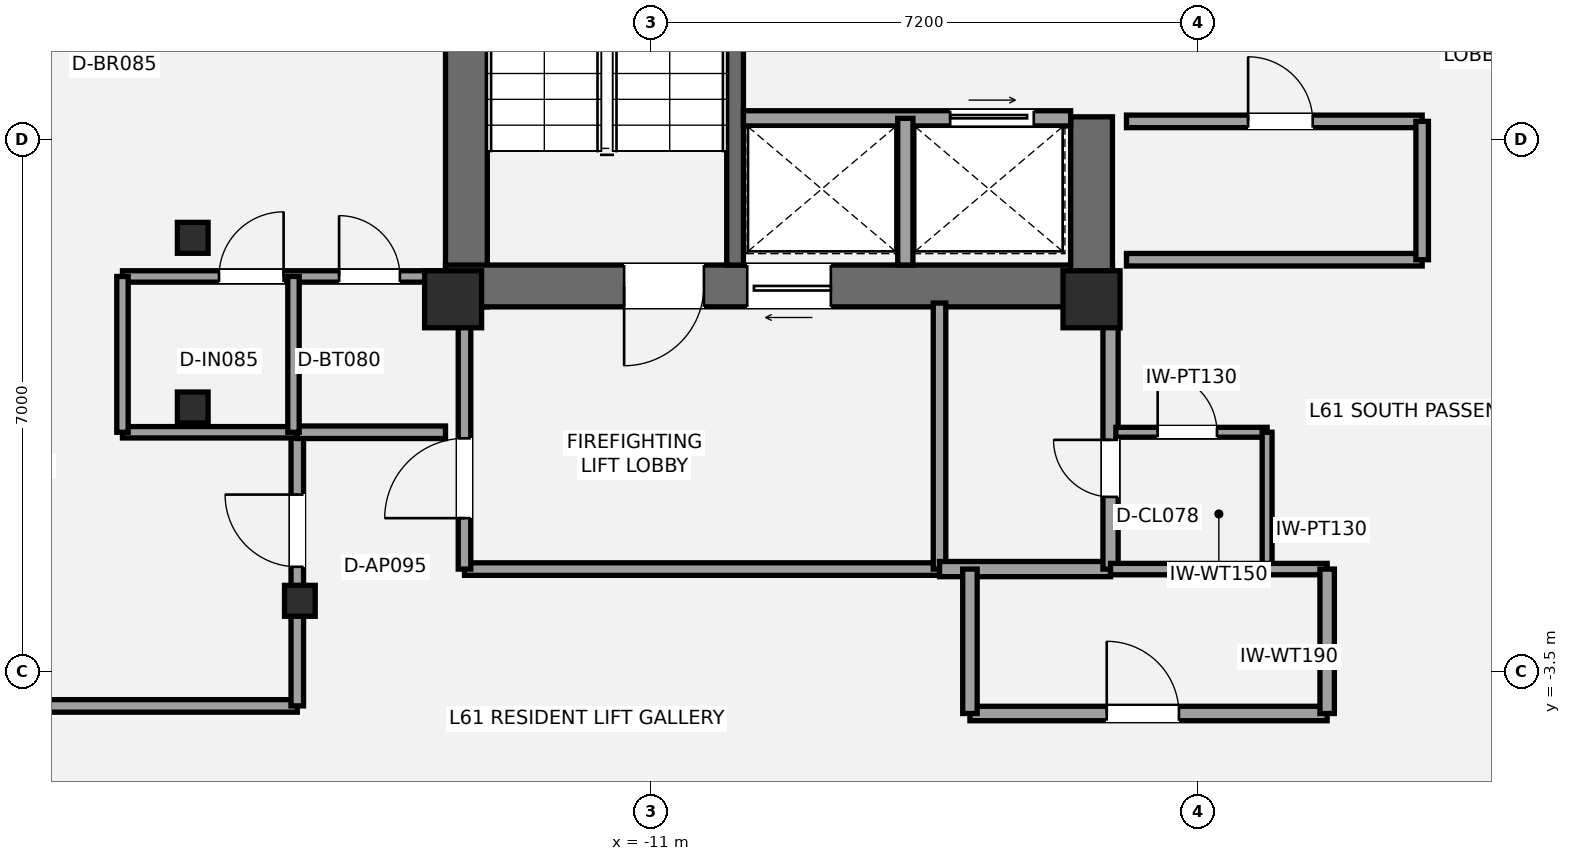
"""IFC4 building model, lengths in metres.
Left out: names, types, materials, properties, quantities, classifications, styles, units other than length and angle.
Written with IfcOpenShell. Run it as: python <this file> out.ifc"""

import sys

from ifc_helpers import new_model, si_unit, direction, frame, frame_2d, origin, origin_2d, place, context, subcontext, project, spatial, rectangle, i_section, extrude, element, fill, save


model = new_model("IFC4")
c1 = context("Model", 3, precision=1e-05, world=origin(), true_north=direction((0.0, 1.0)))
c2 = subcontext(c1, "Body", "Model", "MODEL_VIEW")
j1 = project(units=[si_unit("LENGTHUNIT", "METRE"), si_unit("PLANEANGLEUNIT", "RADIAN")], contexts=[c1])
p1 = place(None, origin())
s1 = spatial("IfcSite", under=j1, at=p1, CompositionType="ELEMENT")
p2 = place(p1, origin())
s2 = spatial("IfcBuilding", under=s1, at=p2, CompositionType="ELEMENT")
p3 = place(p2, frame((0.0, 0.0, 219.45)))
s3 = spatial("IfcBuildingStorey", under=s2, at=p3, CompositionType="ELEMENT", Elevation=219.45)
p4 = place(p3, frame((-13.425, 1.3, 0.0), z_axis=(0.0, 0.0, 1.0), x_axis=(0.0, 1.0, 0.0)))
e1 = element("IfcWall", 1, at=p4, inside=s3, PredefinedType="SHEAR", context=c2, shape_type="SweptSolid", body=[
    extrude(rectangle(XDim=8.25, YDim=0.55, at=frame_2d((4.125, 0.0))), origin(), (0.0, 0.0, 1.0), 3.15),
])
p5 = place(p3, frame((-4.925, 1.575, 0.0), z_axis=(0.0, 0.0, 1.0), x_axis=(-1.0, 0.0, 0.0)))
e2 = element("IfcWall", 2, at=p5, inside=s3, PredefinedType="SHEAR", context=c2, shape_type="SweptSolid", body=[
    extrude(rectangle(XDim=8.775, YDim=0.55, at=frame_2d((4.387, 0.0))), origin(), (0.0, 0.0, 1.0), 3.15),
])
p6 = place(p5, frame((5.375, 0.0, 0.0)))
e3 = element("IfcOpeningElement", 3, at=p6, cuts=e2, PredefinedType="OPENING", context=c2, shape_type="SweptSolid", body=[
    extrude(rectangle(XDim=1.05, YDim=2.15, at=frame_2d((0.525, 1.075))), frame((0.0, 0.285, 0.0), z_axis=(0.0, -1.0, 0.0), x_axis=(1.0, 0.0, 0.0)), (0.0, 0.0, 1.0), 0.57),
])
p7 = place(p5, frame((3.705, 0.0, 0.0)))
e4 = element("IfcOpeningElement", 4, at=p7, cuts=e2, PredefinedType="OPENING", context=c2, shape_type="SweptSolid", body=[
    extrude(rectangle(XDim=1.1, YDim=2.2, at=frame_2d((0.55, 1.1))), frame((0.0, 0.285, 0.0), z_axis=(0.0, -1.0, 0.0), x_axis=(1.0, 0.0, 0.0)), (0.0, 0.0, 1.0), 0.57),
])
p8 = place(p3, frame((-5.2, 1.3, 0.0), z_axis=(0.0, 0.0, 1.0), x_axis=(0.0, 1.0, 0.0)))
e5 = element("IfcWall", 5, at=p8, inside=s3, PredefinedType="SHEAR", context=c2, shape_type="SweptSolid", body=[
    extrude(rectangle(XDim=2.5, YDim=0.55, at=frame_2d((1.25, 0.0))), origin(), (0.0, 0.0, 1.0), 3.15),
])
p9 = place(p3, frame((-9.89, 1.85, 0.0), z_axis=(0.0, 0.0, 1.0), x_axis=(0.0, 1.0, 0.0)))
e6 = element("IfcWall", 6, at=p9, inside=s3, PredefinedType="SHEAR", context=c2, shape_type="SweptSolid", body=[
    extrude(rectangle(XDim=7.15, YDim=0.22, at=frame_2d((3.575, 0.0))), origin(), (0.0, 0.0, 1.0), 3.15),
])
for number, where, z_axis, x_axis in (
    (7, (-13.6, 1.4, 0.0), (0.0, 0.0, 1.0), (1.0, 0.0, 0.0)),
    (8, (-5.2, 1.4, 0.0), (0.0, 0.0, 1.0), (1.0, 0.0, 0.0)),
):
    element("IfcColumn", number, at=place(p3, frame(where, z_axis=z_axis, x_axis=x_axis)), inside=s3, PredefinedType="PILASTER", context=c2, shape_type="SweptSolid", body=[
        extrude(rectangle(XDim=0.75, YDim=0.75, at=origin_2d()), origin(), (0.0, 0.0, 1.0), 3.15),
    ])
for number, where, z_axis, x_axis in (
    (9, (-17.026, 2.208, 0.0), (0.0, 0.0, 1.0), (1.0, 0.0, 0.0)),
    (10, (-17.026, -0.024, 0.0), (0.0, 0.0, 1.0), (1.0, 0.0, 0.0)),
    (11, (-15.616, -2.567, 0.0), (0.0, 0.0, 1.0), (1.0, 0.0, 0.0)),
):
    element("IfcColumn", number, at=place(p3, frame(where, z_axis=z_axis, x_axis=x_axis)), inside=s3, PredefinedType="COLUMN", context=c2, shape_type="SweptSolid", body=[
        extrude(i_section(OverallWidth=0.404, OverallDepth=0.407, WebThickness=0.027, FlangeThickness=0.044, at=origin_2d()), origin(), (0.0, 0.0, 1.0), 3.15),
    ])
p10 = place(p3, frame((-13.45, -2.15, 0.0), z_axis=(0.0, 0.0, 1.0), x_axis=(1.0, 0.0, 0.0)))
e12 = element("IfcWall", 12, at=p10, inside=s3, PredefinedType="PARTITIONING", context=c2, shape_type="SweptSolid", body=[
    extrude(rectangle(XDim=6.25, YDim=0.165, at=frame_2d((3.125, 0.0))), origin(), (0.0, 0.0, 1.0), 2.423),
])
p11 = place(p3, frame((-13.45, -2.15, 0.0), z_axis=(0.0, 0.0, 1.0), x_axis=(0.0, 1.0, 0.0)))
e13 = element("IfcWall", 13, at=p11, inside=s3, PredefinedType="PARTITIONING", context=c2, shape_type="SweptSolid", body=[
    extrude(rectangle(XDim=3.5, YDim=0.165, at=frame_2d((1.75, 0.0))), origin(), (0.0, 0.0, 1.0), 2.423),
])
p12 = place(p11, frame((0.67, 0.0, 0.0)))
e14 = element("IfcOpeningElement", 14, at=p12, cuts=e13, PredefinedType="OPENING", context=c2, shape_type="SweptSolid", body=[
    extrude(rectangle(XDim=1.05, YDim=2.15, at=frame_2d((0.525, 1.075))), frame((0.0, 0.093, 0.0), z_axis=(0.0, -1.0, 0.0), x_axis=(1.0, 0.0, 0.0)), (0.0, 0.0, 1.0), 0.185),
])
p13 = place(p3, frame((-7.2, -2.15, 0.0), z_axis=(0.0, 0.0, 1.0), x_axis=(0.0, 1.0, 0.0)))
e15 = element("IfcWall", 15, at=p13, inside=s3, PredefinedType="PARTITIONING", context=c2, shape_type="SweptSolid", body=[
    extrude(rectangle(XDim=3.5, YDim=0.165, at=frame_2d((1.75, 0.0))), origin(), (0.0, 0.0, 1.0), 2.423),
])
p14 = place(p3, frame((-7.2, -2.15, 0.0), z_axis=(0.0, 0.0, 1.0), x_axis=(1.0, 0.0, 0.0)))
e16 = element("IfcWall", 16, at=p14, inside=s3, PredefinedType="SOLIDWALL", context=c2, shape_type="SweptSolid", body=[
    extrude(rectangle(XDim=2.25, YDim=0.2, at=frame_2d((1.125, 0.0))), origin(), (0.0, 0.0, 1.0), 2.423),
])
p15 = place(p3, frame((-4.95, -2.15, 0.0), z_axis=(0.0, 0.0, 1.0), x_axis=(0.0, 1.0, 0.0)))
e17 = element("IfcWall", 17, at=p15, inside=s3, PredefinedType="SOLIDWALL", context=c2, shape_type="SweptSolid", body=[
    extrude(rectangle(XDim=3.5, YDim=0.2, at=frame_2d((1.75, 0.0))), origin(), (0.0, 0.0, 1.0), 2.423),
])
p16 = place(p15, frame((0.95, 0.0, 0.0)))
e18 = element("IfcOpeningElement", 18, at=p16, cuts=e17, PredefinedType="OPENING", context=c2, shape_type="SweptSolid", body=[
    extrude(rectangle(XDim=0.75, YDim=2.1, at=frame_2d((0.375, 1.05))), frame((0.0, 0.11, 0.0), z_axis=(0.0, -1.0, 0.0), x_axis=(1.0, 0.0, 0.0)), (0.0, 0.0, 1.0), 0.22),
])
p17 = place(p3, frame((-4.88, -0.35, 0.0), z_axis=(0.0, 0.0, 1.0), x_axis=(1.0, 0.0, 0.0)))
e19 = element("IfcWall", 19, at=p17, inside=s3, PredefinedType="PARTITIONING", context=c2, shape_type="SweptSolid", body=[
    extrude(rectangle(XDim=1.99, YDim=0.13, at=frame_2d((0.995, 0.0))), origin(), (0.0, 0.0, 1.0), 2.97),
])
p18 = place(p17, frame((0.55, 0.0, 0.0)))
e20 = element("IfcOpeningElement", 20, at=p18, cuts=e19, PredefinedType="OPENING", context=c2, shape_type="SweptSolid", body=[
    extrude(rectangle(XDim=0.78, YDim=2.1, at=frame_2d((0.39, 1.05))), frame((0.0, 0.075, 0.0), z_axis=(0.0, -1.0, 0.0), x_axis=(1.0, 0.0, 0.0)), (0.0, 0.0, 1.0), 0.15),
])
p19 = place(p3, frame((-2.89, -2.15, 0.0), z_axis=(0.0, 0.0, 1.0), x_axis=(0.0, 1.0, 0.0)))
e21 = element("IfcWall", 21, at=p19, inside=s3, PredefinedType="PARTITIONING", context=c2, shape_type="SweptSolid", body=[
    extrude(rectangle(XDim=1.8, YDim=0.13, at=frame_2d((0.9, 0.0))), origin(), (0.0, 0.0, 1.0), 2.423),
])
p20 = place(p3, frame((-9.78, 3.78, 0.0), z_axis=(0.0, 0.0, 1.0), x_axis=(1.0, 0.0, 0.0)))
e22 = element("IfcWall", 22, at=p20, inside=s3, PredefinedType="SOLIDWALL", context=c2, shape_type="SweptSolid", body=[
    extrude(rectangle(XDim=4.305, YDim=0.2, at=frame_2d((2.152, 0.0))), origin(), (0.0, 0.0, 1.0), 2.97),
])
p21 = place(p20, frame((2.72, 0.0, 0.0)))
e23 = element("IfcOpeningElement", 23, at=p21, cuts=e22, PredefinedType="OPENING", context=c2, shape_type="SweptSolid", body=[
    extrude(rectangle(XDim=1.1, YDim=2.2, at=frame_2d((0.55, 1.1))), frame((0.0, 0.11, 0.0), z_axis=(0.0, -1.0, 0.0), x_axis=(1.0, 0.0, 0.0)), (0.0, 0.0, 1.0), 0.22),
])
p22 = place(p3, frame((-7.65, 1.85, 0.0), z_axis=(0.0, 0.0, 1.0), x_axis=(0.0, 1.0, 0.0)))
e24 = element("IfcWall", 24, at=p22, inside=s3, PredefinedType="SOLIDWALL", context=c2, shape_type="SweptSolid", body=[
    extrude(rectangle(XDim=1.93, YDim=0.2, at=frame_2d((0.965, 0.0))), origin(), (0.0, 0.0, 1.0), 2.97),
])
p23 = place(p3, frame((-4.74, 1.92, 0.0), z_axis=(0.0, 0.0, 1.0), x_axis=(1.0, 0.0, 0.0)))
e25 = element("IfcWall", 25, at=p23, inside=s3, PredefinedType="PARTITIONING", context=c2, shape_type="SweptSolid", body=[
    extrude(rectangle(XDim=3.89, YDim=0.165, at=frame_2d((1.945, 0.0))), origin(), (0.0, 0.0, 1.0), 2.11),
])
p24 = place(p3, frame((-4.74, 3.74, 0.0), z_axis=(0.0, 0.0, 1.0), x_axis=(1.0, 0.0, 0.0)))
e26 = element("IfcWall", 26, at=p24, inside=s3, PredefinedType="PARTITIONING", context=c2, shape_type="SweptSolid", body=[
    extrude(rectangle(XDim=3.89, YDim=0.165, at=frame_2d((1.945, 0.0))), origin(), (0.0, 0.0, 1.0), 2.97),
])
p25 = place(p24, frame((1.6, 0.0, 0.0)))
e27 = element("IfcOpeningElement", 27, at=p25, cuts=e26, PredefinedType="OPENING", context=c2, shape_type="SweptSolid", body=[
    extrude(rectangle(XDim=0.85, YDim=2.1, at=frame_2d((0.425, 1.05))), frame((0.0, 0.093, 0.0), z_axis=(0.0, -1.0, 0.0), x_axis=(1.0, 0.0, 0.0)), (0.0, 0.0, 1.0), 0.185),
])
p26 = place(p3, frame((-0.85, 1.92, 0.0), z_axis=(0.0, 0.0, 1.0), x_axis=(0.0, 1.0, 0.0)))
e28 = element("IfcWall", 28, at=p26, inside=s3, PredefinedType="PARTITIONING", context=c2, shape_type="SweptSolid", body=[
    extrude(rectangle(XDim=1.82, YDim=0.165, at=frame_2d((0.91, 0.0))), origin(), (0.0, 0.0, 1.0), 2.97),
])
p27 = place(p3, frame((-6.8, -4.05, 0.0), z_axis=(0.0, 0.0, 1.0), x_axis=(1.0, 0.0, 0.0)))
e29 = element("IfcWall", 29, at=p27, inside=s3, PredefinedType="PLUMBINGWALL", context=c2, shape_type="SweptSolid", body=[
    extrude(rectangle(XDim=4.7, YDim=0.19, at=frame_2d((2.35, 0.0))), origin(), (0.0, 0.0, 1.0), 2.423),
])
p28 = place(p27, frame((1.8, 0.0, 0.0)))
e30 = element("IfcOpeningElement", 30, at=p28, cuts=e29, PredefinedType="OPENING", context=c2, shape_type="SweptSolid", body=[
    extrude(rectangle(XDim=0.95, YDim=2.15, at=frame_2d((0.475, 1.075))), frame((0.0, 0.105, 0.0), z_axis=(0.0, -1.0, 0.0), x_axis=(1.0, 0.0, 0.0)), (0.0, 0.0, 1.0), 0.21),
])
p29 = place(p3, frame((-4.95, -2.15, 0.0), z_axis=(0.0, 0.0, 1.0), x_axis=(1.0, 0.0, 0.0)))
e31 = element("IfcWall", 31, at=p29, inside=s3, PredefinedType="PLUMBINGWALL", context=c2, shape_type="SweptSolid", body=[
    extrude(rectangle(XDim=2.85, YDim=0.15, at=frame_2d((1.425, 0.0))), origin(), (0.0, 0.0, 1.0), 2.423),
])
for number, where, z_axis, x_axis in (
    (32, (-6.8, -4.05, 0.0), (0.0, 0.0, 1.0), (0.0, 1.0, 0.0)),
    (33, (-2.1, -4.05, 0.0), (0.0, 0.0, 1.0), (0.0, 1.0, 0.0)),
):
    element("IfcWall", number, at=place(p3, frame(where, z_axis=z_axis, x_axis=x_axis)), inside=s3, PredefinedType="PLUMBINGWALL", context=c2, shape_type="SweptSolid", body=[
        extrude(rectangle(XDim=1.9, YDim=0.19, at=frame_2d((0.95, 0.0))), origin(), (0.0, 0.0, 1.0), 2.423),
    ])
p30 = place(p3, frame((-21.716, -3.95, 0.0), z_axis=(0.0, 0.0, 1.0), x_axis=(1.0, 0.0, 0.0)))
e34 = element("IfcWall", 34, at=p30, inside=s3, PredefinedType="PARTITIONING", context=c2, shape_type="SweptSolid", body=[
    extrude(rectangle(XDim=6.066, YDim=0.165, at=frame_2d((3.033, 0.0))), origin(), (0.0, 0.0, 1.0), 2.423),
])
p31 = place(p3, frame((-15.65, -3.95, 0.0), z_axis=(0.0, 0.0, 1.0), x_axis=(0.0, 1.0, 0.0)))
e35 = element("IfcWall", 35, at=p31, inside=s3, PredefinedType="PARTITIONING", context=c2, shape_type="SweptSolid", body=[
    extrude(rectangle(XDim=3.6, YDim=0.165, at=frame_2d((1.8, 0.0))), origin(), (0.0, 0.0, 1.0), 2.357),
])
p32 = place(p31, frame((1.83, 0.0, 0.0)))
e36 = element("IfcOpeningElement", 36, at=p32, cuts=e35, PredefinedType="OPENING", context=c2, shape_type="SweptSolid", body=[
    extrude(rectangle(XDim=0.95, YDim=2.15, at=frame_2d((0.475, 1.075))), frame((0.0, 0.093, 0.0), z_axis=(0.0, -1.0, 0.0), x_axis=(1.0, 0.0, 0.0)), (0.0, 0.0, 1.0), 0.185),
])
p33 = place(p3, frame((-15.65, -0.35, 0.0), z_axis=(0.0, 0.0, 1.0), x_axis=(1.0, 0.0, 0.0)))
e37 = element("IfcWall", 37, at=p33, inside=s3, PredefinedType="PARTITIONING", context=c2, shape_type="SweptSolid", body=[
    extrude(rectangle(XDim=1.95, YDim=0.165, at=frame_2d((0.975, 0.0))), origin(), (0.0, 0.0, 1.0), 2.97),
])
p34 = place(p3, frame((-17.95, 1.7, 0.0), z_axis=(0.0, 0.0, 1.0), x_axis=(1.0, 0.0, 0.0)))
e38 = element("IfcWall", 38, at=p34, inside=s3, PredefinedType="PLUMBINGWALL", context=c2, shape_type="SweptSolid", body=[
    extrude(rectangle(XDim=4.25, YDim=0.15, at=frame_2d((2.125, 0.0))), origin(), (0.0, 0.0, 1.0), 2.423),
])
p35 = place(p34, frame((2.85, 0.0, 0.0)))
e39 = element("IfcOpeningElement", 39, at=p35, cuts=e38, PredefinedType="OPENING", context=c2, shape_type="SweptSolid", body=[
    extrude(rectangle(XDim=0.8, YDim=2.1, at=frame_2d((0.4, 1.05))), frame((0.0, 0.085, 0.0), z_axis=(0.0, -1.0, 0.0), x_axis=(1.0, 0.0, 0.0)), (0.0, 0.0, 1.0), 0.17),
])
p36 = place(p34, frame((1.27, 0.0, 0.0)))
e40 = element("IfcOpeningElement", 40, at=p36, cuts=e38, PredefinedType="OPENING", context=c2, shape_type="SweptSolid", body=[
    extrude(rectangle(XDim=0.85, YDim=2.1, at=frame_2d((0.425, 1.05))), frame((0.0, 0.085, 0.0), z_axis=(0.0, -1.0, 0.0), x_axis=(1.0, 0.0, 0.0)), (0.0, 0.0, 1.0), 0.17),
])
p37 = place(p3, frame((-17.95, -0.35, 0.0), z_axis=(0.0, 0.0, 1.0), x_axis=(1.0, 0.0, 0.0)))
e41 = element("IfcWall", 41, at=p37, inside=s3, PredefinedType="PLUMBINGWALL", context=c2, shape_type="SweptSolid", body=[
    extrude(rectangle(XDim=2.3, YDim=0.15, at=frame_2d((1.15, 0.0))), origin(), (0.0, 0.0, 1.0), 2.423),
])
p38 = place(p3, frame((-15.7, -0.35, 0.0), z_axis=(0.0, 0.0, 1.0), x_axis=(0.0, 1.0, 0.0)))
e42 = element("IfcWall", 42, at=p38, inside=s3, PredefinedType="PLUMBINGWALL", context=c2, shape_type="SweptSolid", body=[
    extrude(rectangle(XDim=2.05, YDim=0.15, at=frame_2d((1.025, 0.0))), origin(), (0.0, 0.0, 1.0), 2.97),
])
p39 = place(p3, frame((-17.95, -0.35, 0.0), z_axis=(0.0, 0.0, 1.0), x_axis=(0.0, 1.0, 0.0)))
e43 = element("IfcWall", 43, at=p39, inside=s3, PredefinedType="PLUMBINGWALL", context=c2, shape_type="SweptSolid", body=[
    extrude(rectangle(XDim=2.05, YDim=0.15, at=frame_2d((1.025, 0.0))), origin(), (0.0, 0.0, 1.0), 2.423),
])
p40 = place(p6, origin())
e44 = element("IfcDoor", 44, at=p40, inside=s3, OperationType="SINGLE_SWING_RIGHT", PredefinedType="DOOR", context=c2, shape_type="SweptSolid", body=[
    extrude(rectangle(XDim=1.05, YDim=2.15, at=frame_2d((0.525, 1.075))), frame((0.0, 0.025, 0.0), z_axis=(0.0, -1.0, 0.0), x_axis=(1.0, 0.0, 0.0)), (0.0, 0.0, 1.0), 0.05),
])
fill(e3, e44)
p41 = place(p12, origin())
e45 = element("IfcDoor", 45, at=p41, inside=s3, OperationType="SINGLE_SWING_LEFT", PredefinedType="DOOR", context=c2, shape_type="SweptSolid", body=[
    extrude(rectangle(XDim=1.05, YDim=2.15, at=frame_2d((0.525, 1.075))), frame((0.0, 0.025, 0.0), z_axis=(0.0, -1.0, 0.0), x_axis=(1.0, 0.0, 0.0)), (0.0, 0.0, 1.0), 0.05),
])
fill(e14, e45)
p42 = place(p16, origin())
e46 = element("IfcDoor", 46, at=p42, inside=s3, OperationType="SINGLE_SWING_RIGHT", PredefinedType="DOOR", context=c2, shape_type="SweptSolid", body=[
    extrude(rectangle(XDim=0.75, YDim=2.1, at=frame_2d((0.375, 1.05))), frame((0.0, 0.025, 0.0), z_axis=(0.0, -1.0, 0.0), x_axis=(1.0, 0.0, 0.0)), (0.0, 0.0, 1.0), 0.05),
])
fill(e18, e46)
p43 = place(p18, origin())
e47 = element("IfcDoor", 47, at=p43, inside=s3, OperationType="SINGLE_SWING_LEFT", PredefinedType="DOOR", context=c2, shape_type="SweptSolid", body=[
    extrude(rectangle(XDim=0.78, YDim=2.1, at=frame_2d((0.39, 1.05))), frame((0.0, 0.025, 0.0), z_axis=(0.0, -1.0, 0.0), x_axis=(1.0, 0.0, 0.0)), (0.0, 0.0, 1.0), 0.05),
])
fill(e20, e47)
p44 = place(p7, origin())
e48 = element("IfcDoor", 48, at=p44, inside=s3, OperationType="SLIDING_TO_LEFT", PredefinedType="DOOR", context=c2, shape_type="SweptSolid", body=[
    extrude(rectangle(XDim=1.1, YDim=2.2, at=frame_2d((0.55, 1.1))), frame((0.0, 0.025, 0.0), z_axis=(0.0, -1.0, 0.0), x_axis=(1.0, 0.0, 0.0)), (0.0, 0.0, 1.0), 0.05),
])
fill(e4, e48)
p45 = place(p21, origin())
e49 = element("IfcDoor", 49, at=p45, inside=s3, OperationType="SLIDING_TO_LEFT", PredefinedType="DOOR", context=c2, shape_type="SweptSolid", body=[
    extrude(rectangle(XDim=1.1, YDim=2.2, at=frame_2d((0.55, 1.1))), frame((0.0, 0.025, 0.0), z_axis=(0.0, -1.0, 0.0), x_axis=(1.0, 0.0, 0.0)), (0.0, 0.0, 1.0), 0.05),
])
fill(e23, e49)
p46 = place(p25, origin())
e50 = element("IfcDoor", 50, at=p46, inside=s3, OperationType="SINGLE_SWING_LEFT", PredefinedType="DOOR", context=c2, shape_type="SweptSolid", body=[
    extrude(rectangle(XDim=0.85, YDim=2.1, at=frame_2d((0.425, 1.05))), frame((0.0, 0.025, 0.0), z_axis=(0.0, -1.0, 0.0), x_axis=(1.0, 0.0, 0.0)), (0.0, 0.0, 1.0), 0.05),
])
fill(e27, e50)
p47 = place(p28, origin())
e51 = element("IfcDoor", 51, at=p47, inside=s3, OperationType="SINGLE_SWING_LEFT", PredefinedType="DOOR", context=c2, shape_type="SweptSolid", body=[
    extrude(rectangle(XDim=0.95, YDim=2.15, at=frame_2d((0.475, 1.075))), frame((0.0, 0.025, 0.0), z_axis=(0.0, -1.0, 0.0), x_axis=(1.0, 0.0, 0.0)), (0.0, 0.0, 1.0), 0.05),
])
fill(e30, e51)
p48 = place(p32, origin())
e52 = element("IfcDoor", 52, at=p48, inside=s3, OperationType="SINGLE_SWING_RIGHT", PredefinedType="DOOR", context=c2, shape_type="SweptSolid", body=[
    extrude(rectangle(XDim=0.95, YDim=2.15, at=frame_2d((0.475, 1.075))), frame((0.0, 0.025, 0.0), z_axis=(0.0, -1.0, 0.0), x_axis=(1.0, 0.0, 0.0)), (0.0, 0.0, 1.0), 0.05),
])
fill(e36, e52)
p49 = place(p35, origin())
e53 = element("IfcDoor", 53, at=p49, inside=s3, OperationType="SINGLE_SWING_LEFT", PredefinedType="DOOR", context=c2, shape_type="SweptSolid", body=[
    extrude(rectangle(XDim=0.8, YDim=2.1, at=frame_2d((0.4, 1.05))), frame((0.0, 0.025, 0.0), z_axis=(0.0, -1.0, 0.0), x_axis=(1.0, 0.0, 0.0)), (0.0, 0.0, 1.0), 0.05),
])
fill(e39, e53)
p50 = place(p36, origin())
e54 = element("IfcDoor", 54, at=p50, inside=s3, OperationType="SINGLE_SWING_RIGHT", PredefinedType="DOOR", context=c2, shape_type="SweptSolid", body=[
    extrude(rectangle(XDim=0.85, YDim=2.1, at=frame_2d((0.425, 1.05))), frame((0.0, 0.025, 0.0), z_axis=(0.0, -1.0, 0.0), x_axis=(1.0, 0.0, 0.0)), (0.0, 0.0, 1.0), 0.05),
])
fill(e40, e54)
save(model, sys.argv[1])
